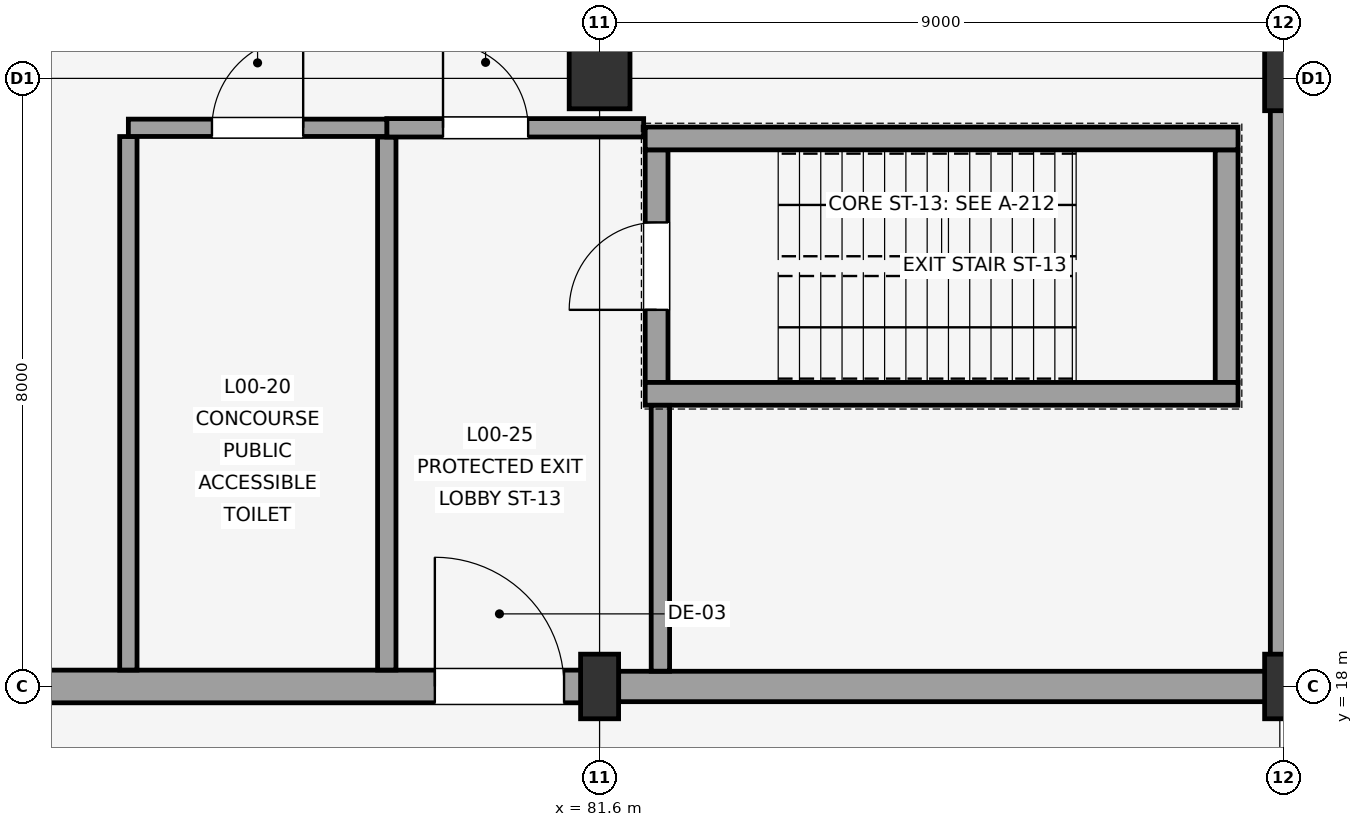
"""IFC4 building model, lengths in metres.
Left out: names, types, materials, properties, quantities, classifications, styles, units other than length and angle.
Written with IfcOpenShell. Run it as: python <this file> out.ifc"""

import sys

from ifc_helpers import new_model, si_unit, direction, frame, frame_2d, origin, origin_2d, place, context, subcontext, project, spatial, rectangle, extrude, element, fill, save


model = new_model("IFC4")
c1 = context("Model", 3, precision=1e-05, world=origin(), true_north=direction((0.0, 1.0)))
c2 = subcontext(c1, "Body", "Model", "MODEL_VIEW")
j1 = project(units=[si_unit("LENGTHUNIT", "METRE"), si_unit("PLANEANGLEUNIT", "RADIAN")], contexts=[c1])
p1 = place(None, origin())
s1 = spatial("IfcSite", under=j1, at=p1, CompositionType="ELEMENT")
p2 = place(p1, origin())
s2 = spatial("IfcBuilding", under=s1, at=p2, CompositionType="ELEMENT")
p3 = place(p2, origin())
s3 = spatial("IfcBuildingStorey", under=s2, at=p3, CompositionType="ELEMENT", Elevation=0.0)
p4 = place(p3, frame((81.6, 18.0, 0.0), z_axis=(0.0, 0.0, 1.0), x_axis=(1.0, 0.0, 0.0)))
e1 = element("IfcColumn", 1, at=p4, inside=s3, PredefinedType="COLUMN", context=c2, shape_type="SweptSolid", body=[
    extrude(rectangle(XDim=0.5, YDim=0.85, at=origin_2d()), origin(), (0.0, 0.0, 1.0), 4.5),
])
p5 = place(p3, frame((81.6, 26.0, 0.0), z_axis=(0.0, 0.0, 1.0), x_axis=(1.0, 0.0, 0.0)))
e2 = element("IfcColumn", 2, at=p5, inside=s3, PredefinedType="COLUMN", context=c2, shape_type="SweptSolid", body=[
    extrude(rectangle(XDim=0.8, YDim=0.8, at=origin_2d()), origin(), (0.0, 0.0, 1.0), 4.5),
])
for number, where, z_axis, x_axis in (
    (3, (90.6, 18.0, 0.0), (0.0, 0.0, 1.0), (1.0, 0.0, 0.0)),
    (4, (90.6, 26.0, 0.0), (0.0, 0.0, 1.0), (1.0, 0.0, 0.0)),
):
    element("IfcColumn", number, at=place(p3, frame(where, z_axis=z_axis, x_axis=x_axis)), inside=s3, PredefinedType="COLUMN", context=c2, shape_type="SweptSolid", body=[
        extrude(rectangle(XDim=0.5, YDim=0.85, at=origin_2d()), origin(), (0.0, 0.0, 1.0), 4.5),
    ])
p6 = place(p3, frame((72.35, 18.0, 0.0), z_axis=(0.0, 0.0, 1.0), x_axis=(1.0, 0.0, 0.0)))
e5 = element("IfcWall", 5, at=p6, inside=s3, PredefinedType="SOLIDWALL", context=c2, shape_type="SweptSolid", body=[
    extrude(rectangle(XDim=9.5, YDim=0.43, at=frame_2d((4.75, 0.0))), origin(), (0.0, 0.0, 1.0), 3.12),
])
p7 = place(p6, frame((7.083, 0.0, 0.0)))
e6 = element("IfcOpeningElement", 6, at=p7, cuts=e5, PredefinedType="OPENING", context=c2, shape_type="SweptSolid", body=[
    extrude(rectangle(XDim=1.7, YDim=2.35, at=frame_2d((0.85, 1.175))), frame((0.0, 0.225, 0.0), z_axis=(0.0, -1.0, 0.0), x_axis=(1.0, 0.0, 0.0)), (0.0, 0.0, 1.0), 0.45),
])
p8 = place(p3, frame((81.851, 18.0, 0.0), z_axis=(0.0, 0.0, 1.0), x_axis=(1.0, 0.0, 0.0)))
e7 = element("IfcWall", 7, at=p8, inside=s3, PredefinedType="SOLIDWALL", context=c2, shape_type="SweptSolid", body=[
    extrude(rectangle(XDim=8.999, YDim=0.4, at=frame_2d((4.5, 0.0))), origin(), (0.0, 0.0, 1.0), 3.12),
])
p9 = place(p3, frame((90.6, 18.201, 0.0), z_axis=(0.0, 0.0, 1.0), x_axis=(0.0, 1.0, 0.0)))
e8 = element("IfcWall", 8, at=p9, inside=s3, PredefinedType="SOLIDWALL", context=c2, shape_type="SweptSolid", body=[
    extrude(rectangle(XDim=8.224, YDim=0.35, at=frame_2d((4.112, 0.0))), origin(), (0.0, 0.0, 1.0), 3.12),
])
p10 = place(p3, frame((82.35, 22.0, 0.0), z_axis=(0.0, 0.0, 1.0), x_axis=(0.0, 1.0, 0.0)))
e9 = element("IfcWall", 9, at=p10, inside=s3, PredefinedType="SHEAR", context=c2, shape_type="SweptSolid", body=[
    extrude(rectangle(XDim=3.06, YDim=0.3, at=frame_2d((1.53, 0.0))), origin(), (0.0, 0.0, 1.0), 4.5),
])
p11 = place(p10, frame((0.955, 0.0, 0.0)))
e10 = element("IfcOpeningElement", 10, at=p11, cuts=e9, PredefinedType="OPENING", context=c2, shape_type="SweptSolid", body=[
    extrude(rectangle(XDim=1.15, YDim=2.15, at=frame_2d((0.575, 1.075))), frame((0.0, 0.16, 0.0), z_axis=(0.0, -1.0, 0.0), x_axis=(1.0, 0.0, 0.0)), (0.0, 0.0, 1.0), 0.32),
])
p12 = place(p3, frame((89.85, 22.0, 0.0), z_axis=(0.0, 0.0, 1.0), x_axis=(0.0, 1.0, 0.0)))
e11 = element("IfcWall", 11, at=p12, inside=s3, PredefinedType="SHEAR", context=c2, shape_type="SweptSolid", body=[
    extrude(rectangle(XDim=3.06, YDim=0.3, at=frame_2d((1.53, 0.0))), origin(), (0.0, 0.0, 1.0), 4.5),
])
for number, where, z_axis, x_axis in (
    (12, (82.2, 21.85, 0.0), (0.0, 0.0, 1.0), (1.0, 0.0, 0.0)),
    (13, (82.2, 25.21, 0.0), (0.0, 0.0, 1.0), (1.0, 0.0, 0.0)),
):
    element("IfcWall", number, at=place(p3, frame(where, z_axis=z_axis, x_axis=x_axis)), inside=s3, PredefinedType="SHEAR", context=c2, shape_type="SweptSolid", body=[
        extrude(rectangle(XDim=7.8, YDim=0.3, at=frame_2d((3.9, 0.0))), origin(), (0.0, 0.0, 1.0), 4.5),
    ])
p13 = place(p3, frame((78.8, 18.216, 0.0), z_axis=(0.0, 0.0, 1.0), x_axis=(0.0, 1.0, 0.0)))
e14 = element("IfcWall", 14, at=p13, inside=s3, PredefinedType="SOLIDWALL", context=c2, shape_type="SweptSolid", body=[
    extrude(rectangle(XDim=7.012, YDim=0.242, at=frame_2d((3.506, 0.0))), origin(), (0.0, 0.0, 1.0), 2.7),
])
p14 = place(p3, frame((78.8, 25.35, 0.0), z_axis=(0.0, 0.0, 1.0), x_axis=(1.0, 0.0, 0.0)))
e15 = element("IfcWall", 15, at=p14, inside=s3, PredefinedType="SOLIDWALL", context=c2, shape_type="SweptSolid", body=[
    extrude(rectangle(XDim=3.38, YDim=0.242, at=frame_2d((1.69, 0.0))), origin(), (0.0, 0.0, 1.0), 2.7),
])
p15 = place(p14, frame((0.74, 0.0, 0.0)))
e16 = element("IfcOpeningElement", 16, at=p15, cuts=e15, PredefinedType="OPENING", context=c2, shape_type="SweptSolid", body=[
    extrude(rectangle(XDim=1.12, YDim=2.18, at=frame_2d((0.56, 1.09))), frame((0.0, 0.131, 0.0), z_axis=(0.0, -1.0, 0.0), x_axis=(1.0, 0.0, 0.0)), (0.0, 0.0, 1.0), 0.262),
])
p16 = place(p3, frame((82.4, 21.699, 0.0), z_axis=(0.0, 0.0, 1.0), x_axis=(0.0, -1.0, 0.0)))
e17 = element("IfcWall", 17, at=p16, inside=s3, PredefinedType="SOLIDWALL", context=c2, shape_type="SweptSolid", body=[
    extrude(rectangle(XDim=3.498, YDim=0.242, at=frame_2d((1.749, 0.0))), origin(), (0.0, 0.0, 1.0), 2.7),
])
p17 = place(p3, frame((75.4, 18.216, 0.0), z_axis=(0.0, 0.0, 1.0), x_axis=(0.0, 1.0, 0.0)))
e18 = element("IfcWall", 18, at=p17, inside=s3, PredefinedType="PLUMBINGWALL", context=c2, shape_type="SweptSolid", body=[
    extrude(rectangle(XDim=7.019, YDim=0.228, at=frame_2d((3.51, 0.0))), origin(), (0.0, 0.0, 1.0), 2.7),
])
p18 = place(p3, frame((75.4, 25.35, 0.0), z_axis=(0.0, 0.0, 1.0), x_axis=(1.0, 0.0, 0.0)))
e19 = element("IfcWall", 19, at=p18, inside=s3, PredefinedType="PLUMBINGWALL", context=c2, shape_type="SweptSolid", body=[
    extrude(rectangle(XDim=3.4, YDim=0.228, at=frame_2d((1.7, 0.0))), origin(), (0.0, 0.0, 1.0), 2.7),
])
p19 = place(p18, frame((1.1, 0.0, 0.0)))
e20 = element("IfcOpeningElement", 20, at=p19, cuts=e19, PredefinedType="OPENING", context=c2, shape_type="SweptSolid", body=[
    extrude(rectangle(XDim=1.2, YDim=2.18, at=frame_2d((0.6, 1.09))), frame((0.0, 0.124, 0.0), z_axis=(0.0, -1.0, 0.0), x_axis=(1.0, 0.0, 0.0)), (0.0, 0.0, 1.0), 0.248),
])
p20 = place(p7, origin())
e21 = element("IfcDoor", 21, at=p20, inside=s3, OperationType="DOUBLE_SWING_LEFT", PredefinedType="DOOR", context=c2, shape_type="SweptSolid", body=[
    extrude(rectangle(XDim=1.7, YDim=2.35, at=frame_2d((0.85, 1.175))), frame((0.0, 0.025, 0.0), z_axis=(0.0, -1.0, 0.0), x_axis=(1.0, 0.0, 0.0)), (0.0, 0.0, 1.0), 0.05),
])
fill(e6, e21)
p21 = place(p11, origin())
e22 = element("IfcDoor", 22, at=p21, inside=s3, OperationType="SINGLE_SWING_LEFT", PredefinedType="DOOR", context=c2, shape_type="SweptSolid", body=[
    extrude(rectangle(XDim=1.15, YDim=2.15, at=frame_2d((0.575, 1.075))), frame((0.0, 0.025, 0.0), z_axis=(0.0, -1.0, 0.0), x_axis=(1.0, 0.0, 0.0)), (0.0, 0.0, 1.0), 0.05),
])
fill(e10, e22)
p22 = place(p15, origin())
e23 = element("IfcDoor", 23, at=p22, inside=s3, OperationType="SINGLE_SWING_LEFT", PredefinedType="DOOR", context=c2, shape_type="SweptSolid", body=[
    extrude(rectangle(XDim=1.12, YDim=2.18, at=frame_2d((0.56, 1.09))), frame((0.0, 0.025, 0.0), z_axis=(0.0, -1.0, 0.0), x_axis=(1.0, 0.0, 0.0)), (0.0, 0.0, 1.0), 0.05),
])
fill(e16, e23)
p23 = place(p19, origin())
e24 = element("IfcDoor", 24, at=p23, inside=s3, OperationType="SINGLE_SWING_RIGHT", PredefinedType="DOOR", context=c2, shape_type="SweptSolid", body=[
    extrude(rectangle(XDim=1.2, YDim=2.18, at=frame_2d((0.6, 1.09))), frame((0.0, 0.025, 0.0), z_axis=(0.0, -1.0, 0.0), x_axis=(1.0, 0.0, 0.0)), (0.0, 0.0, 1.0), 0.05),
])
fill(e20, e24)
save(model, sys.argv[1])
